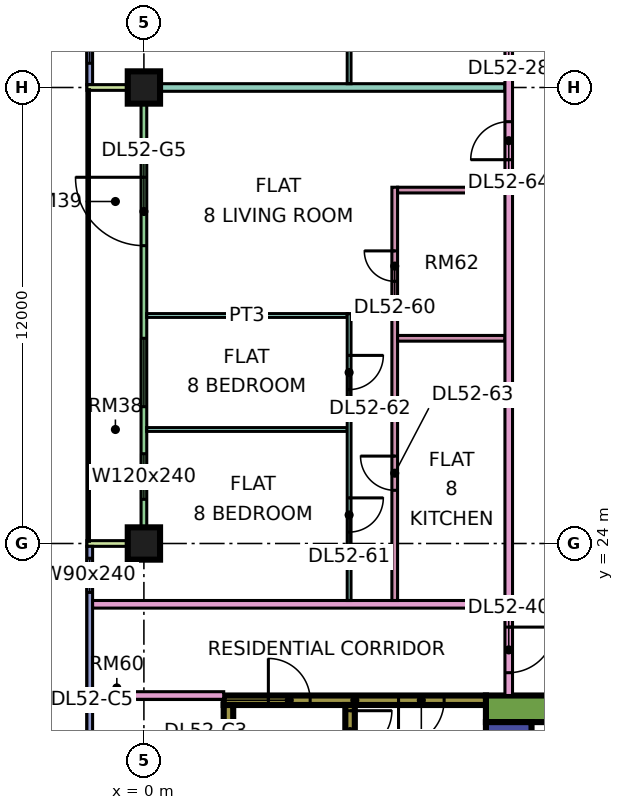
"""IFC4 building model, lengths in metres.
Left out: names, types, materials, properties, quantities, classifications, styles, units other than length and angle.
Written with IfcOpenShell. Run it as: python <this file> out.ifc"""

import sys

from ifc_helpers import new_model, si_unit, direction, frame, frame_2d, origin, origin_2d, place, context, subcontext, project, spatial, rectangle, extrude, element, fill, save


model = new_model("IFC4")
c1 = context("Model", 3, precision=1e-05, world=origin(), true_north=direction((0.0, 1.0)))
c2 = subcontext(c1, "Body", "Model", "MODEL_VIEW")
j1 = project(units=[si_unit("LENGTHUNIT", "METRE"), si_unit("PLANEANGLEUNIT", "RADIAN")], contexts=[c1])
p1 = place(None, origin())
s1 = spatial("IfcSite", under=j1, at=p1, CompositionType="ELEMENT")
p2 = place(p1, origin())
s2 = spatial("IfcBuilding", under=s1, at=p2, CompositionType="ELEMENT")
p3 = place(p2, frame((0.0, 0.0, 222.9)))
s3 = spatial("IfcBuildingStorey", under=s2, at=p3, CompositionType="ELEMENT", Elevation=222.9)
p4 = place(p3, frame((0.0, 24.0, 0.0), z_axis=(0.0, 0.0, 1.0), x_axis=(1.0, 0.0, 0.0)))
e1 = element("IfcColumn", 1, at=p4, inside=s3, PredefinedType="COLUMN", context=c2, shape_type="SweptSolid", body=[
    extrude(rectangle(XDim=0.85, YDim=0.85, at=origin_2d()), origin(), (0.0, 0.0, 1.0), 3.75),
])
p5 = place(p3, frame((0.0, 36.0, 0.0), z_axis=(0.0, 0.0, 1.0), x_axis=(1.0, 0.0, 0.0)))
e2 = element("IfcColumn", 2, at=p5, inside=s3, PredefinedType="COLUMN", context=c2, shape_type="SweptSolid", body=[
    extrude(rectangle(XDim=0.85, YDim=0.85, at=origin_2d()), origin(), (0.0, 0.0, 1.0), 3.75),
])
p6 = place(p3, frame((9.0, 19.65, 0.0), z_axis=(0.0, 0.0, 1.0), x_axis=(1.0, 0.0, 0.0)))
e3 = element("IfcWall", 3, at=p6, inside=s3, PredefinedType="SHEAR", context=c2, shape_type="SweptSolid", body=[
    extrude(rectangle(XDim=25.0, YDim=0.7, at=frame_2d((12.5, 0.0))), origin(), (0.0, 0.0, 1.0), 3.75),
])
p7 = place(p6, frame((19.1, 0.0, 0.0)))
e4 = element("IfcOpeningElement", 4, at=p7, cuts=e3, PredefinedType="OPENING", context=c2, shape_type="SweptSolid", body=[
    extrude(rectangle(XDim=1.8, YDim=2.4, at=frame_2d((0.9, 1.2))), frame((0.0, 0.36, 0.0), z_axis=(0.0, -1.0, 0.0), x_axis=(1.0, 0.0, 0.0)), (0.0, 0.0, 1.0), 0.72),
])
p8 = place(p3, frame((9.6, 7.7, 0.0), z_axis=(0.0, 0.0, 1.0), x_axis=(0.0, 1.0, 0.0)))
e5 = element("IfcWall", 5, at=p8, inside=s3, PredefinedType="SHEAR", context=c2, shape_type="SweptSolid", body=[
    extrude(rectangle(XDim=11.6, YDim=1.2, at=frame_2d((5.8, 0.0))), origin(), (0.0, 0.0, 1.0), 3.75),
])
p9 = place(p8, frame((4.175, 0.0, 0.0)))
e6 = element("IfcOpeningElement", 6, at=p9, cuts=e5, PredefinedType="OPENING", context=c2, shape_type="SweptSolid", body=[
    extrude(rectangle(XDim=1.1, YDim=2.2, at=frame_2d((0.55, 1.1))), frame((0.0, 0.61, 0.0), z_axis=(0.0, -1.0, 0.0), x_axis=(1.0, 0.0, 0.0)), (0.0, 0.0, 1.0), 1.22),
])
p10 = place(p8, frame((6.675, 0.0, 0.0)))
e7 = element("IfcOpeningElement", 7, at=p10, cuts=e5, PredefinedType="OPENING", context=c2, shape_type="SweptSolid", body=[
    extrude(rectangle(XDim=1.1, YDim=2.2, at=frame_2d((0.55, 1.1))), frame((0.0, 0.61, 0.0), z_axis=(0.0, -1.0, 0.0), x_axis=(1.0, 0.0, 0.0)), (0.0, 0.0, 1.0), 1.22),
])
p11 = place(p8, frame((9.55, 0.0, 0.0)))
e8 = element("IfcOpeningElement", 8, at=p11, cuts=e5, PredefinedType="OPENING", context=c2, shape_type="SweptSolid", body=[
    extrude(rectangle(XDim=1.1, YDim=2.2, at=frame_2d((0.55, 1.1))), frame((0.0, 0.61, 0.0), z_axis=(0.0, -1.0, 0.0), x_axis=(1.0, 0.0, 0.0)), (0.0, 0.0, 1.0), 1.22),
])
p12 = place(p8, frame((1.85, 0.0, 0.0)))
e9 = element("IfcOpeningElement", 9, at=p12, cuts=e5, PredefinedType="OPENING", context=c2, shape_type="SweptSolid", body=[
    extrude(rectangle(XDim=0.9, YDim=2.1, at=frame_2d((0.45, 1.05))), frame((0.0, 0.61, 0.0), z_axis=(0.0, -1.0, 0.0), x_axis=(1.0, 0.0, 0.0)), (0.0, 0.0, 1.0), 1.22),
])
p13 = place(p3, frame((2.1, 19.875, 0.0), z_axis=(0.0, 0.0, 1.0), x_axis=(1.0, 0.0, 0.0)))
e10 = element("IfcWall", 10, at=p13, inside=s3, PredefinedType="SHEAR", context=c2, shape_type="SweptSolid", body=[
    extrude(rectangle(XDim=6.9, YDim=0.25, at=frame_2d((3.45, 0.0))), origin(), (0.0, 0.0, 1.0), 3.75),
])
p14 = place(p13, frame((1.175, 0.0, 0.0)))
e11 = element("IfcOpeningElement", 11, at=p14, cuts=e10, PredefinedType="OPENING", context=c2, shape_type="SweptSolid", body=[
    extrude(rectangle(XDim=1.1, YDim=2.2, at=frame_2d((0.55, 1.1))), frame((0.0, 0.135, 0.0), z_axis=(0.0, -1.0, 0.0), x_axis=(1.0, 0.0, 0.0)), (0.0, 0.0, 1.0), 0.27),
])
p15 = place(p13, frame((4.6, 0.0, 0.0)))
e12 = element("IfcOpeningElement", 12, at=p15, cuts=e10, PredefinedType="OPENING", context=c2, shape_type="SweptSolid", body=[
    extrude(rectangle(XDim=1.2, YDim=2.2, at=frame_2d((0.6, 1.1))), frame((0.0, 0.135, 0.0), z_axis=(0.0, -1.0, 0.0), x_axis=(1.0, 0.0, 0.0)), (0.0, 0.0, 1.0), 0.27),
])
p16 = place(p3, frame((2.225, 13.25, 0.0), z_axis=(0.0, 0.0, 1.0), x_axis=(0.0, 1.0, 0.0)))
e13 = element("IfcWall", 13, at=p16, inside=s3, PredefinedType="SHEAR", context=c2, shape_type="SweptSolid", body=[
    extrude(rectangle(XDim=6.5, YDim=0.25, at=frame_2d((3.25, 0.0))), origin(), (0.0, 0.0, 1.0), 3.75),
])
p17 = place(p3, frame((5.425, 13.25, 0.0), z_axis=(0.0, 0.0, 1.0), x_axis=(0.0, 1.0, 0.0)))
e14 = element("IfcWall", 14, at=p17, inside=s3, PredefinedType="SHEAR", context=c2, shape_type="SweptSolid", body=[
    extrude(rectangle(XDim=6.5, YDim=0.25, at=frame_2d((3.25, 0.0))), origin(), (0.0, 0.0, 1.0), 3.75),
])
p18 = place(p17, frame((5.25, 0.0, 0.0)))
e15 = element("IfcOpeningElement", 15, at=p18, cuts=e14, PredefinedType="OPENING", context=c2, shape_type="SweptSolid", body=[
    extrude(rectangle(XDim=1.1, YDim=2.2, at=frame_2d((0.55, 1.1))), frame((0.0, 0.135, 0.0), z_axis=(0.0, -1.0, 0.0), x_axis=(1.0, 0.0, 0.0)), (0.0, 0.0, 1.0), 0.27),
])
p19 = place(p3, frame((-1.425, 47.925, 0.0), z_axis=(0.0, 0.0, 1.0), x_axis=(0.0, -1.0, 0.0)))
e16 = element("IfcWall", 16, at=p19, inside=s3, PredefinedType="SOLIDWALL", context=c2, shape_type="SweptSolid", body=[
    extrude(rectangle(XDim=11.85, YDim=0.15, at=frame_2d((5.925, 0.0))), origin(), (0.0, 0.0, 1.0), 3.35),
])
p20 = place(p19, frame((0.562, 0.0, 0.45)))
e17 = element("IfcOpeningElement", 17, at=p20, cuts=e16, PredefinedType="OPENING", context=c2, shape_type="SweptSolid", body=[
    extrude(rectangle(XDim=1.8, YDim=2.4, at=frame_2d((0.9, 1.2))), frame((0.0, 0.085, 0.0), z_axis=(0.0, -1.0, 0.0), x_axis=(1.0, 0.0, 0.0)), (0.0, 0.0, 1.0), 0.17),
])
p21 = place(p19, frame((3.525, 0.0, 0.45)))
e18 = element("IfcOpeningElement", 18, at=p21, cuts=e16, PredefinedType="OPENING", context=c2, shape_type="SweptSolid", body=[
    extrude(rectangle(XDim=1.8, YDim=2.4, at=frame_2d((0.9, 1.2))), frame((0.0, 0.085, 0.0), z_axis=(0.0, -1.0, 0.0), x_axis=(1.0, 0.0, 0.0)), (0.0, 0.0, 1.0), 0.17),
])
p22 = place(p19, frame((6.525, 0.0, 0.45)))
e19 = element("IfcOpeningElement", 19, at=p22, cuts=e16, PredefinedType="OPENING", context=c2, shape_type="SweptSolid", body=[
    extrude(rectangle(XDim=1.8, YDim=2.4, at=frame_2d((0.9, 1.2))), frame((0.0, 0.085, 0.0), z_axis=(0.0, -1.0, 0.0), x_axis=(1.0, 0.0, 0.0)), (0.0, 0.0, 1.0), 0.17),
])
p23 = place(p19, frame((9.488, 0.0, 0.45)))
e20 = element("IfcOpeningElement", 20, at=p23, cuts=e16, PredefinedType="OPENING", context=c2, shape_type="SweptSolid", body=[
    extrude(rectangle(XDim=1.8, YDim=2.4, at=frame_2d((0.9, 1.2))), frame((0.0, 0.085, 0.0), z_axis=(0.0, -1.0, 0.0), x_axis=(1.0, 0.0, 0.0)), (0.0, 0.0, 1.0), 0.17),
])
p24 = place(p3, frame((0.0, 35.925, 0.0), z_axis=(0.0, 0.0, 1.0), x_axis=(0.0, -1.0, 0.0)))
e21 = element("IfcWall", 21, at=p24, inside=s3, PredefinedType="SOLIDWALL", context=c2, shape_type="SweptSolid", body=[
    extrude(rectangle(XDim=11.85, YDim=0.15, at=frame_2d((5.925, 0.0))), origin(), (0.0, 0.0, 1.0), 3.35),
])
p25 = place(p24, frame((2.288, 0.0, 0.0)))
e22 = element("IfcOpeningElement", 22, at=p25, cuts=e21, PredefinedType="OPENING", context=c2, shape_type="SweptSolid", body=[
    extrude(rectangle(XDim=1.8, YDim=2.4, at=frame_2d((0.9, 1.2))), frame((0.0, 0.085, 0.0), z_axis=(0.0, -1.0, 0.0), x_axis=(1.0, 0.0, 0.0)), (0.0, 0.0, 1.0), 0.17),
])
p26 = place(p24, frame((6.525, 0.0, 0.45)))
e23 = element("IfcOpeningElement", 23, at=p26, cuts=e21, PredefinedType="OPENING", context=c2, shape_type="SweptSolid", body=[
    extrude(rectangle(XDim=1.8, YDim=2.4, at=frame_2d((0.9, 1.2))), frame((0.0, 0.085, 0.0), z_axis=(0.0, -1.0, 0.0), x_axis=(1.0, 0.0, 0.0)), (0.0, 0.0, 1.0), 0.17),
])
p27 = place(p24, frame((9.562, 0.0, 0.45)))
e24 = element("IfcOpeningElement", 24, at=p27, cuts=e21, PredefinedType="OPENING", context=c2, shape_type="SweptSolid", body=[
    extrude(rectangle(XDim=1.2, YDim=2.4, at=frame_2d((0.6, 1.2))), frame((0.0, 0.085, 0.0), z_axis=(0.0, -1.0, 0.0), x_axis=(1.0, 0.0, 0.0)), (0.0, 0.0, 1.0), 0.17),
])
for number, where, z_axis, x_axis in (
    (25, (-1.5, 36.0, 0.0), (0.0, 0.0, 1.0), (1.0, 0.0, 0.0)),
    (26, (-1.5, 24.0, 0.0), (0.0, 0.0, 1.0), (1.0, 0.0, 0.0)),
):
    element("IfcWall", number, at=place(p3, frame(where, z_axis=z_axis, x_axis=x_axis)), inside=s3, PredefinedType="SOLIDWALL", context=c2, shape_type="SweptSolid", body=[
        extrude(rectangle(XDim=1.5, YDim=0.15, at=frame_2d((0.75, 0.0))), origin(), (0.0, 0.0, 1.0), 3.35),
    ])
p28 = place(p3, frame((-1.425, 23.925, 0.0), z_axis=(0.0, 0.0, 1.0), x_axis=(0.0, -1.0, 0.0)))
e27 = element("IfcWall", 27, at=p28, inside=s3, PredefinedType="SOLIDWALL", context=c2, shape_type="SweptSolid", body=[
    extrude(rectangle(XDim=11.425, YDim=0.15, at=frame_2d((5.712, 0.0))), origin(), (0.0, 0.0, 1.0), 3.35),
])
p29 = place(p28, frame((0.312, 0.0, 0.45)))
e28 = element("IfcOpeningElement", 28, at=p29, cuts=e27, PredefinedType="OPENING", context=c2, shape_type="SweptSolid", body=[
    extrude(rectangle(XDim=0.9, YDim=2.4, at=frame_2d((0.45, 1.2))), frame((0.0, 0.085, 0.0), z_axis=(0.0, -1.0, 0.0), x_axis=(1.0, 0.0, 0.0)), (0.0, 0.0, 1.0), 0.17),
])
p30 = place(p28, frame((6.175, 0.0, 0.45)))
e29 = element("IfcOpeningElement", 29, at=p30, cuts=e27, PredefinedType="OPENING", context=c2, shape_type="SweptSolid", body=[
    extrude(rectangle(XDim=3.0, YDim=2.4, at=frame_2d((1.5, 1.2))), frame((0.0, 0.085, 0.0), z_axis=(0.0, -1.0, 0.0), x_axis=(1.0, 0.0, 0.0)), (0.0, 0.0, 1.0), 0.17),
])
p31 = place(p3, frame((-1.35, 20.0, 0.0), z_axis=(0.0, 0.0, 1.0), x_axis=(1.0, 0.0, 0.0)))
e30 = element("IfcWall", 30, at=p31, inside=s3, PredefinedType="PARTITIONING", context=c2, shape_type="SweptSolid", body=[
    extrude(rectangle(XDim=3.45, YDim=0.2, at=frame_2d((1.725, 0.0))), origin(), (0.0, 0.0, 1.0), 3.35),
])
p32 = place(p3, frame((-1.35, 22.4, 0.0), z_axis=(0.0, 0.0, 1.0), x_axis=(1.0, 0.0, 0.0)))
e31 = element("IfcWall", 31, at=p32, inside=s3, PredefinedType="PARTITIONING", context=c2, shape_type="SweptSolid", body=[
    extrude(rectangle(XDim=10.85, YDim=0.2, at=frame_2d((5.425, 0.0))), origin(), (0.0, 0.0, 1.0), 3.35),
])
e32 = element("IfcWall", 32, at=p5, inside=s3, PredefinedType="PARTITIONING", context=c2, shape_type="SweptSolid", body=[
    extrude(rectangle(XDim=9.5, YDim=0.2, at=frame_2d((4.75, 0.0))), origin(), (0.0, 0.0, 1.0), 3.35),
])
for number, where, z_axis, x_axis in (
    (33, (0.074, 27.0, 0.0), (0.0, 0.0, 1.0), (1.0, 0.0, 0.0)),
    (34, (0.074, 30.0, 0.0), (0.0, 0.0, 1.0), (1.0, 0.0, 0.0)),
):
    element("IfcWall", number, at=place(p3, frame(where, z_axis=z_axis, x_axis=x_axis)), inside=s3, PredefinedType="PARTITIONING", context=c2, shape_type="SweptSolid", body=[
        extrude(rectangle(XDim=5.276, YDim=0.1, at=frame_2d((2.638, 0.0))), origin(), (0.0, 0.0, 1.0), 3.35),
    ])
p33 = place(p3, frame((5.4, 22.5, 0.0), z_axis=(0.0, 0.0, 1.0), x_axis=(0.0, 1.0, 0.0)))
e35 = element("IfcWall", 35, at=p33, inside=s3, PredefinedType="PARTITIONING", context=c2, shape_type="SweptSolid", body=[
    extrude(rectangle(XDim=7.55, YDim=0.1, at=frame_2d((3.775, 0.0))), origin(), (0.0, 0.0, 1.0), 3.35),
])
p34 = place(p33, frame((1.8, 0.0, 0.0)))
e36 = element("IfcOpeningElement", 36, at=p34, cuts=e35, PredefinedType="OPENING", context=c2, shape_type="SweptSolid", body=[
    extrude(rectangle(XDim=0.9, YDim=2.1, at=frame_2d((0.45, 1.05))), frame((0.0, 0.06, 0.0), z_axis=(0.0, -1.0, 0.0), x_axis=(1.0, 0.0, 0.0)), (0.0, 0.0, 1.0), 0.12),
])
p35 = place(p33, frame((5.55, 0.0, 0.0)))
e37 = element("IfcOpeningElement", 37, at=p35, cuts=e35, PredefinedType="OPENING", context=c2, shape_type="SweptSolid", body=[
    extrude(rectangle(XDim=0.9, YDim=2.1, at=frame_2d((0.45, 1.05))), frame((0.0, 0.06, 0.0), z_axis=(0.0, -1.0, 0.0), x_axis=(1.0, 0.0, 0.0)), (0.0, 0.0, 1.0), 0.12),
])
p36 = place(p3, frame((5.4, 36.1, 0.0), z_axis=(0.0, 0.0, 1.0), x_axis=(0.0, 1.0, 0.0)))
e38 = element("IfcWall", 38, at=p36, inside=s3, PredefinedType="PARTITIONING", context=c2, shape_type="SweptSolid", body=[
    extrude(rectangle(XDim=8.95, YDim=0.1, at=frame_2d((4.475, 0.0))), origin(), (0.0, 0.0, 1.0), 3.35),
])
p37 = place(p36, frame((0.95, 0.0, 0.0)))
e39 = element("IfcOpeningElement", 39, at=p37, cuts=e38, PredefinedType="OPENING", context=c2, shape_type="SweptSolid", body=[
    extrude(rectangle(XDim=0.9, YDim=2.1, at=frame_2d((0.45, 1.05))), frame((0.0, 0.06, 0.0), z_axis=(0.0, -1.0, 0.0), x_axis=(1.0, 0.0, 0.0)), (0.0, 0.0, 1.0), 0.12),
])
p38 = place(p36, frame((3.95, 0.0, 0.0)))
e40 = element("IfcOpeningElement", 40, at=p38, cuts=e38, PredefinedType="OPENING", context=c2, shape_type="SweptSolid", body=[
    extrude(rectangle(XDim=0.9, YDim=2.1, at=frame_2d((0.45, 1.05))), frame((0.0, 0.06, 0.0), z_axis=(0.0, -1.0, 0.0), x_axis=(1.0, 0.0, 0.0)), (0.0, 0.0, 1.0), 0.12),
])
p39 = place(p36, frame((6.95, 0.0, 0.0)))
e41 = element("IfcOpeningElement", 41, at=p39, cuts=e38, PredefinedType="OPENING", context=c2, shape_type="SweptSolid", body=[
    extrude(rectangle(XDim=0.9, YDim=2.1, at=frame_2d((0.45, 1.05))), frame((0.0, 0.06, 0.0), z_axis=(0.0, -1.0, 0.0), x_axis=(1.0, 0.0, 0.0)), (0.0, 0.0, 1.0), 0.12),
])
p40 = place(p3, frame((6.6, 22.5, 0.0), z_axis=(0.0, 0.0, 1.0), x_axis=(0.0, 1.0, 0.0)))
e42 = element("IfcWall", 42, at=p40, inside=s3, PredefinedType="PARTITIONING", context=c2, shape_type="SweptSolid", body=[
    extrude(rectangle(XDim=10.875, YDim=0.15, at=frame_2d((5.438, 0.0))), origin(), (0.0, 0.0, 1.0), 3.35),
])
p41 = place(p40, frame((8.4, 0.0, 0.0)))
e43 = element("IfcOpeningElement", 43, at=p41, cuts=e42, PredefinedType="OPENING", context=c2, shape_type="SweptSolid", body=[
    extrude(rectangle(XDim=0.8, YDim=2.1, at=frame_2d((0.4, 1.05))), frame((0.0, 0.085, 0.0), z_axis=(0.0, -1.0, 0.0), x_axis=(1.0, 0.0, 0.0)), (0.0, 0.0, 1.0), 0.17),
])
p42 = place(p40, frame((2.9, 0.0, 0.0)))
e44 = element("IfcOpeningElement", 44, at=p42, cuts=e42, PredefinedType="OPENING", context=c2, shape_type="SweptSolid", body=[
    extrude(rectangle(XDim=0.9, YDim=2.1, at=frame_2d((0.45, 1.05))), frame((0.0, 0.085, 0.0), z_axis=(0.0, -1.0, 0.0), x_axis=(1.0, 0.0, 0.0)), (0.0, 0.0, 1.0), 0.17),
])
for number, where, z_axis, x_axis in (
    (45, (6.675, 29.4, 0.0), (0.0, 0.0, 1.0), (1.0, 0.0, 0.0)),
    (46, (6.675, 33.3, 0.0), (0.0, 0.0, 1.0), (1.0, 0.0, 0.0)),
):
    element("IfcWall", number, at=place(p3, frame(where, z_axis=z_axis, x_axis=x_axis)), inside=s3, PredefinedType="PARTITIONING", context=c2, shape_type="SweptSolid", body=[
        extrude(rectangle(XDim=2.825, YDim=0.15, at=frame_2d((1.413, 0.0))), origin(), (0.0, 0.0, 1.0), 3.35),
    ])
p43 = place(p3, frame((9.6, 20.0, 0.0), z_axis=(0.0, 0.0, 1.0), x_axis=(0.0, 1.0, 0.0)))
e47 = element("IfcWall", 47, at=p43, inside=s3, PredefinedType="PARTITIONING", context=c2, shape_type="SweptSolid", body=[
    extrude(rectangle(XDim=42.926, YDim=0.2, at=frame_2d((21.463, 0.0))), origin(), (0.0, 0.0, 1.0), 3.35),
])
p44 = place(p43, frame((17.1, 0.0, 0.0)))
e48 = element("IfcOpeningElement", 48, at=p44, cuts=e47, PredefinedType="OPENING", context=c2, shape_type="SweptSolid", body=[
    extrude(rectangle(XDim=1.0, YDim=2.1, at=frame_2d((0.5, 1.05))), frame((0.0, 0.11, 0.0), z_axis=(0.0, -1.0, 0.0), x_axis=(1.0, 0.0, 0.0)), (0.0, 0.0, 1.0), 0.22),
])
p45 = place(p43, frame((32.1, 0.0, 0.0)))
e49 = element("IfcOpeningElement", 49, at=p45, cuts=e47, PredefinedType="OPENING", context=c2, shape_type="SweptSolid", body=[
    extrude(rectangle(XDim=1.0, YDim=2.1, at=frame_2d((0.5, 1.05))), frame((0.0, 0.11, 0.0), z_axis=(0.0, -1.0, 0.0), x_axis=(1.0, 0.0, 0.0)), (0.0, 0.0, 1.0), 0.22),
])
p46 = place(p43, frame((0.6, 0.0, 0.0)))
e50 = element("IfcOpeningElement", 50, at=p46, cuts=e47, PredefinedType="OPENING", context=c2, shape_type="SweptSolid", body=[
    extrude(rectangle(XDim=1.2, YDim=2.1, at=frame_2d((0.6, 1.05))), frame((0.0, 0.11, 0.0), z_axis=(0.0, -1.0, 0.0), x_axis=(1.0, 0.0, 0.0)), (0.0, 0.0, 1.0), 0.22),
])
p47 = place(p43, frame((14.1, 0.0, 0.0)))
e51 = element("IfcOpeningElement", 51, at=p47, cuts=e47, PredefinedType="OPENING", context=c2, shape_type="SweptSolid", body=[
    extrude(rectangle(XDim=1.0, YDim=2.1, at=frame_2d((0.5, 1.05))), frame((0.0, 0.11, 0.0), z_axis=(0.0, -1.0, 0.0), x_axis=(1.0, 0.0, 0.0)), (0.0, 0.0, 1.0), 0.22),
])
p48 = place(p23, origin())
e52 = element("IfcWindow", 52, at=p48, inside=s3, PartitioningType="SINGLE_PANEL", PredefinedType="WINDOW", context=c2, shape_type="SweptSolid", body=[
    extrude(rectangle(XDim=1.8, YDim=2.4, at=frame_2d((0.9, 1.2))), frame((0.0, 0.03, 0.0), z_axis=(0.0, -1.0, 0.0), x_axis=(1.0, 0.0, 0.0)), (0.0, 0.0, 1.0), 0.06),
])
fill(e20, e52)
p49 = place(p25, frame((1.8, 0.0, 0.0), z_axis=(0.0, 0.0, 1.0), x_axis=(-1.0, 0.0, 0.0)))
e53 = element("IfcDoor", 53, at=p49, inside=s3, OperationType="DOUBLE_DOOR_SINGLE_SWING", PredefinedType="DOOR", context=c2, shape_type="SweptSolid", body=[
    extrude(rectangle(XDim=1.8, YDim=2.4, at=frame_2d((0.9, 1.2))), frame((0.0, 0.025, 0.0), z_axis=(0.0, -1.0, 0.0), x_axis=(1.0, 0.0, 0.0)), (0.0, 0.0, 1.0), 0.05),
])
fill(e22, e53)
p50 = place(p26, origin())
e54 = element("IfcWindow", 54, at=p50, inside=s3, PartitioningType="SINGLE_PANEL", PredefinedType="WINDOW", context=c2, shape_type="SweptSolid", body=[
    extrude(rectangle(XDim=1.8, YDim=2.4, at=frame_2d((0.9, 1.2))), frame((0.0, 0.03, 0.0), z_axis=(0.0, -1.0, 0.0), x_axis=(1.0, 0.0, 0.0)), (0.0, 0.0, 1.0), 0.06),
])
fill(e23, e54)
p51 = place(p27, origin())
e55 = element("IfcWindow", 55, at=p51, inside=s3, PartitioningType="SINGLE_PANEL", PredefinedType="WINDOW", context=c2, shape_type="SweptSolid", body=[
    extrude(rectangle(XDim=1.2, YDim=2.4, at=frame_2d((0.6, 1.2))), frame((0.0, 0.03, 0.0), z_axis=(0.0, -1.0, 0.0), x_axis=(1.0, 0.0, 0.0)), (0.0, 0.0, 1.0), 0.06),
])
fill(e24, e55)
p52 = place(p29, origin())
e56 = element("IfcWindow", 56, at=p52, inside=s3, PartitioningType="SINGLE_PANEL", PredefinedType="WINDOW", context=c2, shape_type="SweptSolid", body=[
    extrude(rectangle(XDim=0.9, YDim=2.4, at=frame_2d((0.45, 1.2))), frame((0.0, 0.03, 0.0), z_axis=(0.0, -1.0, 0.0), x_axis=(1.0, 0.0, 0.0)), (0.0, 0.0, 1.0), 0.06),
])
fill(e28, e56)
p53 = place(p18, origin())
e57 = element("IfcDoor", 57, at=p53, inside=s3, OperationType="SINGLE_SWING_RIGHT", PredefinedType="DOOR", context=c2, shape_type="SweptSolid", body=[
    extrude(rectangle(XDim=1.1, YDim=2.2, at=frame_2d((0.55, 1.1))), frame((0.0, 0.025, 0.0), z_axis=(0.0, -1.0, 0.0), x_axis=(1.0, 0.0, 0.0)), (0.0, 0.0, 1.0), 0.05),
])
fill(e15, e57)
p54 = place(p14, origin())
e58 = element("IfcDoor", 58, at=p54, inside=s3, OperationType="SINGLE_SWING_LEFT", PredefinedType="DOOR", context=c2, shape_type="SweptSolid", body=[
    extrude(rectangle(XDim=1.1, YDim=2.2, at=frame_2d((0.55, 1.1))), frame((0.0, 0.025, 0.0), z_axis=(0.0, -1.0, 0.0), x_axis=(1.0, 0.0, 0.0)), (0.0, 0.0, 1.0), 0.05),
])
fill(e11, e58)
p55 = place(p15, frame((1.2, 0.0, 0.0), z_axis=(0.0, 0.0, 1.0), x_axis=(-1.0, 0.0, 0.0)))
e59 = element("IfcDoor", 59, at=p55, inside=s3, OperationType="SINGLE_SWING_LEFT", PredefinedType="DOOR", context=c2, shape_type="SweptSolid", body=[
    extrude(rectangle(XDim=1.2, YDim=2.2, at=frame_2d((0.6, 1.1))), frame((0.0, 0.025, 0.0), z_axis=(0.0, -1.0, 0.0), x_axis=(1.0, 0.0, 0.0)), (0.0, 0.0, 1.0), 0.05),
])
fill(e12, e59)
p56 = place(p46, origin())
e60 = element("IfcDoor", 60, at=p56, inside=s3, OperationType="SINGLE_SWING_RIGHT", PredefinedType="DOOR", context=c2, shape_type="SweptSolid", body=[
    extrude(rectangle(XDim=1.2, YDim=2.1, at=frame_2d((0.6, 1.05))), frame((0.0, 0.025, 0.0), z_axis=(0.0, -1.0, 0.0), x_axis=(1.0, 0.0, 0.0)), (0.0, 0.0, 1.0), 0.05),
])
fill(e50, e60)
p57 = place(p41, frame((0.8, 0.0, 0.0), z_axis=(0.0, 0.0, 1.0), x_axis=(-1.0, 0.0, 0.0)))
e61 = element("IfcDoor", 61, at=p57, inside=s3, OperationType="SINGLE_SWING_RIGHT", PredefinedType="DOOR", context=c2, shape_type="SweptSolid", body=[
    extrude(rectangle(XDim=0.8, YDim=2.1, at=frame_2d((0.4, 1.05))), frame((0.0, 0.025, 0.0), z_axis=(0.0, -1.0, 0.0), x_axis=(1.0, 0.0, 0.0)), (0.0, 0.0, 1.0), 0.05),
])
fill(e43, e61)
p58 = place(p34, origin())
e62 = element("IfcDoor", 62, at=p58, inside=s3, OperationType="SINGLE_SWING_RIGHT", PredefinedType="DOOR", context=c2, shape_type="SweptSolid", body=[
    extrude(rectangle(XDim=0.9, YDim=2.1, at=frame_2d((0.45, 1.05))), frame((0.0, 0.025, 0.0), z_axis=(0.0, -1.0, 0.0), x_axis=(1.0, 0.0, 0.0)), (0.0, 0.0, 1.0), 0.05),
])
fill(e36, e62)
p59 = place(p35, origin())
e63 = element("IfcDoor", 63, at=p59, inside=s3, OperationType="SINGLE_SWING_RIGHT", PredefinedType="DOOR", context=c2, shape_type="SweptSolid", body=[
    extrude(rectangle(XDim=0.9, YDim=2.1, at=frame_2d((0.45, 1.05))), frame((0.0, 0.025, 0.0), z_axis=(0.0, -1.0, 0.0), x_axis=(1.0, 0.0, 0.0)), (0.0, 0.0, 1.0), 0.05),
])
fill(e37, e63)
p60 = place(p42, frame((0.9, 0.0, 0.0), z_axis=(0.0, 0.0, 1.0), x_axis=(-1.0, 0.0, 0.0)))
e64 = element("IfcDoor", 64, at=p60, inside=s3, OperationType="SINGLE_SWING_RIGHT", PredefinedType="DOOR", context=c2, shape_type="SweptSolid", body=[
    extrude(rectangle(XDim=0.9, YDim=2.1, at=frame_2d((0.45, 1.05))), frame((0.0, 0.025, 0.0), z_axis=(0.0, -1.0, 0.0), x_axis=(1.0, 0.0, 0.0)), (0.0, 0.0, 1.0), 0.05),
])
fill(e44, e64)
p61 = place(p47, origin())
e65 = element("IfcDoor", 65, at=p61, inside=s3, OperationType="SINGLE_SWING_LEFT", PredefinedType="DOOR", context=c2, shape_type="SweptSolid", body=[
    extrude(rectangle(XDim=1.0, YDim=2.1, at=frame_2d((0.5, 1.05))), frame((0.0, 0.025, 0.0), z_axis=(0.0, -1.0, 0.0), x_axis=(1.0, 0.0, 0.0)), (0.0, 0.0, 1.0), 0.05),
])
fill(e51, e65)
save(model, sys.argv[1])
